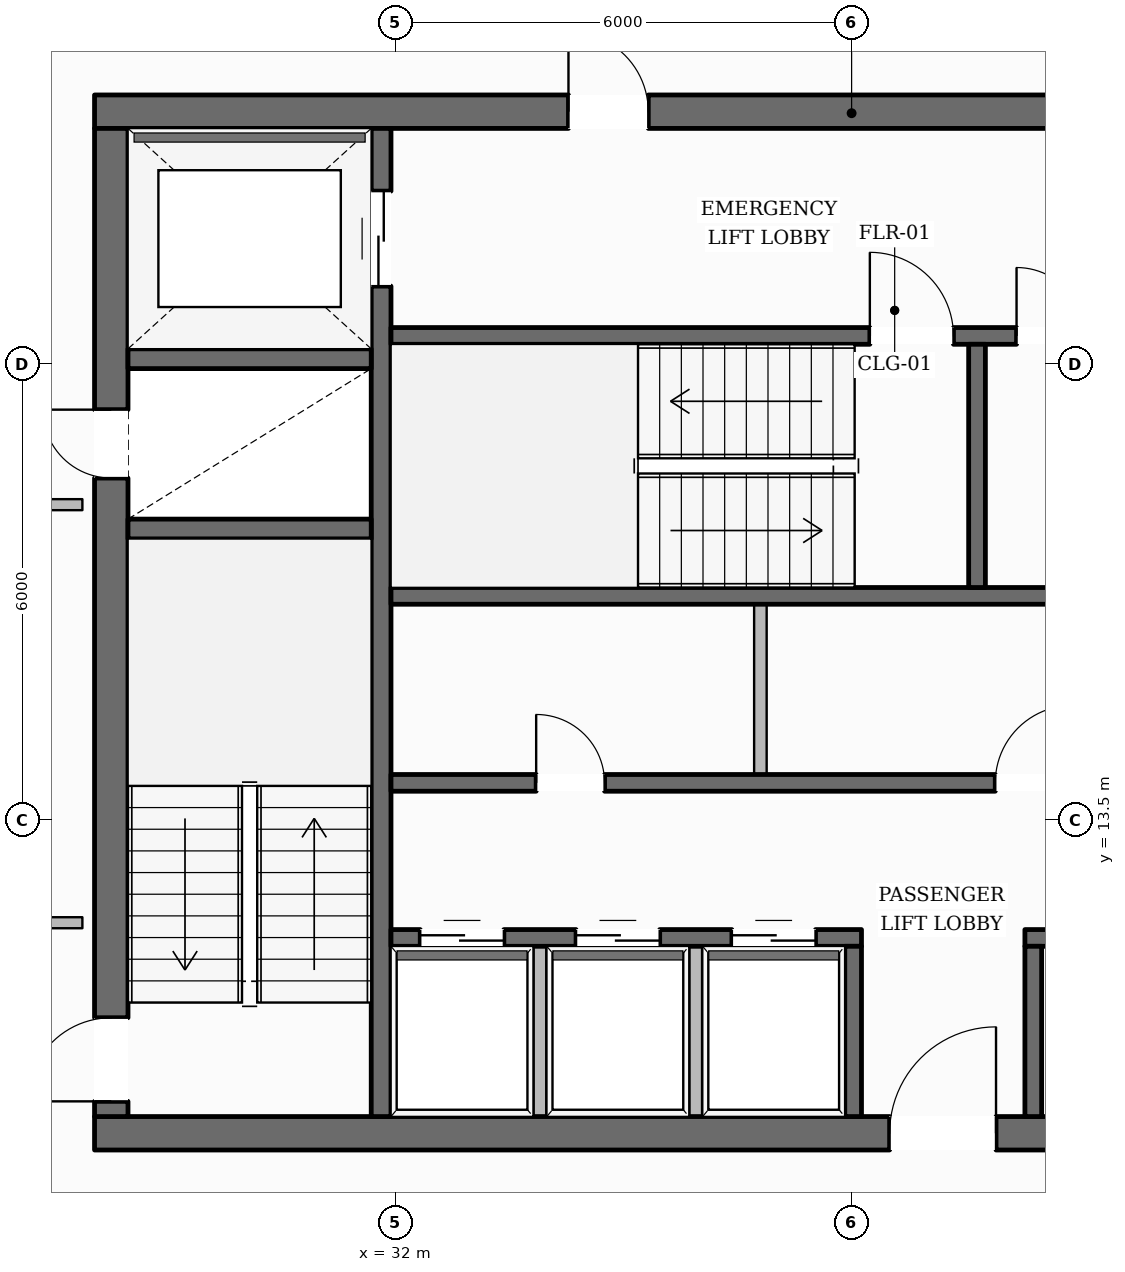
"""IFC4 building model, lengths in metres.
Left out: names, types, materials, properties, quantities, classifications, styles, units other than length and angle.
Written with IfcOpenShell. Run it as: python <this file> out.ifc"""

import sys

from ifc_helpers import new_model, si_unit, direction, frame, frame_2d, origin, place, context, subcontext, project, spatial, rectangle, extrude, element, fill, save


model = new_model("IFC4")
c1 = context("Model", 3, precision=1e-05, world=origin(), true_north=direction((0.0, 1.0)))
c2 = subcontext(c1, "Body", "Model", "MODEL_VIEW")
j1 = project(units=[si_unit("LENGTHUNIT", "METRE"), si_unit("PLANEANGLEUNIT", "RADIAN")], contexts=[c1])
p1 = place(None, origin())
s1 = spatial("IfcSite", under=j1, at=p1, CompositionType="ELEMENT")
p2 = place(p1, origin())
s2 = spatial("IfcBuilding", under=s1, at=p2, CompositionType="ELEMENT")
p3 = place(p2, frame((0.0, 0.0, 226.6)))
s3 = spatial("IfcBuildingStorey", under=s2, at=p3, CompositionType="ELEMENT", Elevation=226.6)
p4 = place(p3, frame((28.04, 9.38, 0.0), z_axis=(0.0, 0.0, 1.0), x_axis=(1.0, 0.0, 0.0)))
e1 = element("IfcWall", 1, at=p4, inside=s3, PredefinedType="SOLIDWALL", context=c2, shape_type="SweptSolid", body=[
    extrude(rectangle(XDim=19.92, YDim=0.44, at=frame_2d((9.96, 0.0))), origin(), (0.0, 0.0, 1.0), 3.6),
])
p5 = place(p4, frame((10.46, 0.0, 0.0)))
e2 = element("IfcOpeningElement", 2, at=p5, cuts=e1, PredefinedType="OPENING", context=c2, shape_type="SweptSolid", body=[
    extrude(rectangle(XDim=1.4, YDim=2.2, at=frame_2d((0.7, 1.1))), frame((0.0, 0.23, 0.0), z_axis=(0.0, -1.0, 0.0), x_axis=(1.0, 0.0, 0.0)), (0.0, 0.0, 1.0), 0.46),
])
p6 = place(p3, frame((28.04, 22.82, 0.0), z_axis=(0.0, 0.0, 1.0), x_axis=(1.0, 0.0, 0.0)))
e3 = element("IfcWall", 3, at=p6, inside=s3, PredefinedType="SOLIDWALL", context=c2, shape_type="SweptSolid", body=[
    extrude(rectangle(XDim=19.92, YDim=0.44, at=frame_2d((9.96, 0.0))), origin(), (0.0, 0.0, 1.0), 3.6),
])
p7 = place(p6, frame((6.235, 0.0, 0.0)))
e4 = element("IfcOpeningElement", 4, at=p7, cuts=e3, PredefinedType="OPENING", context=c2, shape_type="SweptSolid", body=[
    extrude(rectangle(XDim=1.05, YDim=2.15, at=frame_2d((0.525, 1.075))), frame((0.0, 0.23, 0.0), z_axis=(0.0, -1.0, 0.0), x_axis=(1.0, 0.0, 0.0)), (0.0, 0.0, 1.0), 0.46),
])
p8 = place(p6, frame((12.635, 0.0, 0.0)))
e5 = element("IfcOpeningElement", 5, at=p8, cuts=e3, PredefinedType="OPENING", context=c2, shape_type="SweptSolid", body=[
    extrude(rectangle(XDim=1.05, YDim=2.15, at=frame_2d((0.525, 1.075))), frame((0.0, 0.23, 0.0), z_axis=(0.0, -1.0, 0.0), x_axis=(1.0, 0.0, 0.0)), (0.0, 0.0, 1.0), 0.46),
])
p9 = place(p3, frame((28.26, 9.6, 0.0), z_axis=(0.0, 0.0, 1.0), x_axis=(0.0, 1.0, 0.0)))
e6 = element("IfcWall", 6, at=p9, inside=s3, PredefinedType="SOLIDWALL", context=c2, shape_type="SweptSolid", body=[
    extrude(rectangle(XDim=13.0, YDim=0.44, at=frame_2d((6.5, 0.0))), origin(), (0.0, 0.0, 1.0), 3.6),
])
p10 = place(p9, frame((0.2, 0.0, 0.0)))
e7 = element("IfcOpeningElement", 7, at=p10, cuts=e6, PredefinedType="OPENING", context=c2, shape_type="SweptSolid", body=[
    extrude(rectangle(XDim=1.1, YDim=2.15, at=frame_2d((0.55, 1.075))), frame((0.0, 0.23, 0.0), z_axis=(0.0, -1.0, 0.0), x_axis=(1.0, 0.0, 0.0)), (0.0, 0.0, 1.0), 0.46),
])
p11 = place(p9, frame((8.4, 0.0, 0.0)))
e8 = element("IfcOpeningElement", 8, at=p11, cuts=e6, PredefinedType="OPENING", context=c2, shape_type="SweptSolid", body=[
    extrude(rectangle(XDim=0.9, YDim=2.1, at=frame_2d((0.45, 1.05))), frame((0.0, 0.23, 0.0), z_axis=(0.0, -1.0, 0.0), x_axis=(1.0, 0.0, 0.0)), (0.0, 0.0, 1.0), 0.46),
])
p12 = place(p3, frame((31.81, 9.6, 0.0), z_axis=(0.0, 0.0, 1.0), x_axis=(0.0, 1.0, 0.0)))
e9 = element("IfcWall", 9, at=p12, inside=s3, PredefinedType="SHEAR", context=c2, shape_type="SweptSolid", body=[
    extrude(rectangle(XDim=13.0, YDim=0.26, at=frame_2d((6.5, 0.0))), origin(), (0.0, 0.0, 1.0), 3.6),
])
p13 = place(p12, frame((10.925, 0.0, 0.0)))
e10 = element("IfcOpeningElement", 10, at=p13, cuts=e9, PredefinedType="OPENING", context=c2, shape_type="SweptSolid", body=[
    extrude(rectangle(XDim=1.25, YDim=2.25, at=frame_2d((0.625, 1.125))), frame((0.0, 0.14, 0.0), z_axis=(0.0, -1.0, 0.0), x_axis=(1.0, 0.0, 0.0)), (0.0, 0.0, 1.0), 0.28),
])
for number, where, z_axis, x_axis in (
    (11, (28.48, 17.33, 0.0), (0.0, 0.0, 1.0), (1.0, 0.0, 0.0)),
    (12, (28.48, 19.57, 0.0), (0.0, 0.0, 1.0), (1.0, 0.0, 0.0)),
):
    element("IfcWall", number, at=place(p3, frame(where, z_axis=z_axis, x_axis=x_axis)), inside=s3, PredefinedType="SHEAR", context=c2, shape_type="SweptSolid", body=[
        extrude(rectangle(XDim=3.2, YDim=0.26, at=frame_2d((1.6, 0.0))), origin(), (0.0, 0.0, 1.0), 3.6),
    ])
p14 = place(p3, frame((31.94, 19.87, 0.0), z_axis=(0.0, 0.0, 1.0), x_axis=(1.0, 0.0, 0.0)))
e13 = element("IfcWall", 13, at=p14, inside=s3, PredefinedType="SOLIDWALL", context=c2, shape_type="SweptSolid", body=[
    extrude(rectangle(XDim=12.12, YDim=0.22, at=frame_2d((6.06, 0.0))), origin(), (0.0, 0.0, 1.0), 3.6),
])
p15 = place(p14, frame((6.3, 0.0, 0.0)))
e14 = element("IfcOpeningElement", 14, at=p15, cuts=e13, PredefinedType="OPENING", context=c2, shape_type="SweptSolid", body=[
    extrude(rectangle(XDim=1.1, YDim=2.15, at=frame_2d((0.55, 1.075))), frame((0.0, 0.12, 0.0), z_axis=(0.0, -1.0, 0.0), x_axis=(1.0, 0.0, 0.0)), (0.0, 0.0, 1.0), 0.24),
])
p16 = place(p14, frame((8.23, 0.0, 0.0)))
e15 = element("IfcOpeningElement", 15, at=p16, cuts=e13, PredefinedType="OPENING", context=c2, shape_type="SweptSolid", body=[
    extrude(rectangle(XDim=0.9, YDim=2.1, at=frame_2d((0.45, 1.05))), frame((0.0, 0.12, 0.0), z_axis=(0.0, -1.0, 0.0), x_axis=(1.0, 0.0, 0.0)), (0.0, 0.0, 1.0), 0.24),
])
p17 = place(p14, frame((10.45, 0.0, 0.0)))
e16 = element("IfcOpeningElement", 16, at=p17, cuts=e13, PredefinedType="OPENING", context=c2, shape_type="SweptSolid", body=[
    extrude(rectangle(XDim=0.9, YDim=2.1, at=frame_2d((0.45, 1.05))), frame((0.0, 0.12, 0.0), z_axis=(0.0, -1.0, 0.0), x_axis=(1.0, 0.0, 0.0)), (0.0, 0.0, 1.0), 0.24),
])
p18 = place(p3, frame((31.94, 16.45, 0.0), z_axis=(0.0, 0.0, 1.0), x_axis=(1.0, 0.0, 0.0)))
e17 = element("IfcWall", 17, at=p18, inside=s3, PredefinedType="SOLIDWALL", context=c2, shape_type="SweptSolid", body=[
    extrude(rectangle(XDim=12.12, YDim=0.22, at=frame_2d((6.06, 0.0))), origin(), (0.0, 0.0, 1.0), 3.6),
])
p19 = place(p3, frame((39.65, 16.56, 0.0), z_axis=(0.0, 0.0, 1.0), x_axis=(0.0, 1.0, 0.0)))
e18 = element("IfcWall", 18, at=p19, inside=s3, PredefinedType="SOLIDWALL", context=c2, shape_type="SweptSolid", body=[
    extrude(rectangle(XDim=3.2, YDim=0.22, at=frame_2d((1.6, 0.0))), origin(), (0.0, 0.0, 1.0), 3.6),
])
p20 = place(p3, frame((31.94, 13.99, 0.0), z_axis=(0.0, 0.0, 1.0), x_axis=(1.0, 0.0, 0.0)))
e19 = element("IfcWall", 19, at=p20, inside=s3, PredefinedType="SOLIDWALL", context=c2, shape_type="SweptSolid", body=[
    extrude(rectangle(XDim=12.12, YDim=0.22, at=frame_2d((6.06, 0.0))), origin(), (0.0, 0.0, 1.0), 3.6),
])
p21 = place(p20, frame((1.91, 0.0, 0.0)))
e20 = element("IfcOpeningElement", 20, at=p21, cuts=e19, PredefinedType="OPENING", context=c2, shape_type="SweptSolid", body=[
    extrude(rectangle(XDim=0.9, YDim=2.1, at=frame_2d((0.45, 1.05))), frame((0.0, 0.12, 0.0), z_axis=(0.0, -1.0, 0.0), x_axis=(1.0, 0.0, 0.0)), (0.0, 0.0, 1.0), 0.24),
])
p22 = place(p20, frame((7.95, 0.0, 0.0)))
e21 = element("IfcOpeningElement", 21, at=p22, cuts=e19, PredefinedType="OPENING", context=c2, shape_type="SweptSolid", body=[
    extrude(rectangle(XDim=1.02, YDim=2.15, at=frame_2d((0.51, 1.075))), frame((0.0, 0.12, 0.0), z_axis=(0.0, -1.0, 0.0), x_axis=(1.0, 0.0, 0.0)), (0.0, 0.0, 1.0), 0.24),
])
p23 = place(p3, frame((31.94, 11.95, 0.0), z_axis=(0.0, 0.0, 1.0), x_axis=(1.0, 0.0, 0.0)))
e22 = element("IfcWall", 22, at=p23, inside=s3, PredefinedType="SOLIDWALL", context=c2, shape_type="SweptSolid", body=[
    extrude(rectangle(XDim=6.19, YDim=0.22, at=frame_2d((3.095, 0.0))), origin(), (0.0, 0.0, 1.0), 3.6),
])
p24 = place(p23, frame((0.385, 0.0, 0.0)))
e23 = element("IfcOpeningElement", 23, at=p24, cuts=e22, PredefinedType="OPENING", context=c2, shape_type="SweptSolid", body=[
    extrude(rectangle(XDim=1.1, YDim=2.2, at=frame_2d((0.55, 1.1))), frame((0.0, 0.12, 0.0), z_axis=(0.0, -1.0, 0.0), x_axis=(1.0, 0.0, 0.0)), (0.0, 0.0, 1.0), 0.24),
])
p25 = place(p23, frame((2.435, 0.0, 0.0)))
e24 = element("IfcOpeningElement", 24, at=p25, cuts=e22, PredefinedType="OPENING", context=c2, shape_type="SweptSolid", body=[
    extrude(rectangle(XDim=1.1, YDim=2.2, at=frame_2d((0.55, 1.1))), frame((0.0, 0.12, 0.0), z_axis=(0.0, -1.0, 0.0), x_axis=(1.0, 0.0, 0.0)), (0.0, 0.0, 1.0), 0.24),
])
p26 = place(p23, frame((4.485, 0.0, 0.0)))
e25 = element("IfcOpeningElement", 25, at=p26, cuts=e22, PredefinedType="OPENING", context=c2, shape_type="SweptSolid", body=[
    extrude(rectangle(XDim=1.1, YDim=2.2, at=frame_2d((0.55, 1.1))), frame((0.0, 0.12, 0.0), z_axis=(0.0, -1.0, 0.0), x_axis=(1.0, 0.0, 0.0)), (0.0, 0.0, 1.0), 0.24),
])
p27 = place(p3, frame((40.28, 11.95, 0.0), z_axis=(0.0, 0.0, 1.0), x_axis=(1.0, 0.0, 0.0)))
e26 = element("IfcWall", 26, at=p27, inside=s3, PredefinedType="SOLIDWALL", context=c2, shape_type="SweptSolid", body=[
    extrude(rectangle(XDim=3.78, YDim=0.22, at=frame_2d((1.89, 0.0))), origin(), (0.0, 0.0, 1.0), 3.6),
])
p28 = place(p27, frame((1.55, 0.0, 0.0)))
e27 = element("IfcOpeningElement", 27, at=p28, cuts=e26, PredefinedType="OPENING", context=c2, shape_type="SweptSolid", body=[
    extrude(rectangle(XDim=0.9, YDim=2.1, at=frame_2d((0.45, 1.05))), frame((0.0, 0.12, 0.0), z_axis=(0.0, -1.0, 0.0), x_axis=(1.0, 0.0, 0.0)), (0.0, 0.0, 1.0), 0.24),
])
for number, where, z_axis, x_axis in (
    (28, (38.02, 9.6, 0.0), (0.0, 0.0, 1.0), (0.0, 1.0, 0.0)),
    (29, (40.39, 9.6, 0.0), (0.0, 0.0, 1.0), (0.0, 1.0, 0.0)),
):
    element("IfcWall", number, at=place(p3, frame(where, z_axis=z_axis, x_axis=x_axis)), inside=s3, PredefinedType="SOLIDWALL", context=c2, shape_type="SweptSolid", body=[
        extrude(rectangle(XDim=2.24, YDim=0.22, at=frame_2d((1.12, 0.0))), origin(), (0.0, 0.0, 1.0), 3.6),
    ])
p29 = place(p3, frame((14.425, 10.865, 0.0), z_axis=(0.0, 0.0, 1.0), x_axis=(0.497768108872, 0.867310157781, 0.0)))
e30 = element("IfcWall", 30, at=p29, inside=s3, PredefinedType="STANDARD", context=c2, shape_type="SweptSolid", body=[
    extrude(rectangle(XDim=39.647, YDim=0.35, at=frame_2d((19.823, 0.0))), origin(), (0.0, 0.0, 1.0), 3.132),
])
p30 = place(p29, frame((35.221, 0.0, 0.65)))
e31 = element("IfcOpeningElement", 31, at=p30, cuts=e30, PredefinedType="OPENING", context=c2, shape_type="SweptSolid", body=[
    extrude(rectangle(XDim=1.45, YDim=1.75, at=frame_2d((0.725, 0.875))), frame((0.0, 0.185, 0.0), z_axis=(0.0, -1.0, 0.0), x_axis=(1.0, 0.0, 0.0)), (0.0, 0.0, 1.0), 0.37),
])
p31 = place(p29, frame((28.771, 0.0, 0.65)))
e32 = element("IfcOpeningElement", 32, at=p31, cuts=e30, PredefinedType="OPENING", context=c2, shape_type="SweptSolid", body=[
    extrude(rectangle(XDim=1.45, YDim=1.75, at=frame_2d((0.725, 0.875))), frame((0.0, 0.185, 0.0), z_axis=(0.0, -1.0, 0.0), x_axis=(1.0, 0.0, 0.0)), (0.0, 0.0, 1.0), 0.37),
])
p32 = place(p29, frame((15.872, 0.0, 0.65)))
e33 = element("IfcOpeningElement", 33, at=p32, cuts=e30, PredefinedType="OPENING", context=c2, shape_type="SweptSolid", body=[
    extrude(rectangle(XDim=1.45, YDim=1.75, at=frame_2d((0.725, 0.875))), frame((0.0, 0.185, 0.0), z_axis=(0.0, -1.0, 0.0), x_axis=(1.0, 0.0, 0.0)), (0.0, 0.0, 1.0), 0.37),
])
p33 = place(p29, frame((9.423, 0.0, 0.65)))
e34 = element("IfcOpeningElement", 34, at=p33, cuts=e30, PredefinedType="OPENING", context=c2, shape_type="SweptSolid", body=[
    extrude(rectangle(XDim=1.45, YDim=1.75, at=frame_2d((0.725, 0.875))), frame((0.0, 0.185, 0.0), z_axis=(0.0, -1.0, 0.0), x_axis=(1.0, 0.0, 0.0)), (0.0, 0.0, 1.0), 0.37),
])
p34 = place(p29, frame((2.973, 0.0, 0.65)))
e35 = element("IfcOpeningElement", 35, at=p34, cuts=e30, PredefinedType="OPENING", context=c2, shape_type="SweptSolid", body=[
    extrude(rectangle(XDim=1.45, YDim=1.75, at=frame_2d((0.725, 0.875))), frame((0.0, 0.185, 0.0), z_axis=(0.0, -1.0, 0.0), x_axis=(1.0, 0.0, 0.0)), (0.0, 0.0, 1.0), 0.37),
])
for number, where, z_axis, x_axis in (
    (36, (33.9, 9.52, 0.0), (0.0, 0.0, 1.0), (0.0, 1.0, 0.0)),
    (37, (35.95, 9.52, 0.0), (0.0, 0.0, 1.0), (0.0, 1.0, 0.0)),
):
    element("IfcWall", number, at=place(p3, frame(where, z_axis=z_axis, x_axis=x_axis)), inside=s3, PredefinedType="PARTITIONING", context=c2, shape_type="SweptSolid", body=[
        extrude(rectangle(XDim=2.32, YDim=0.165, at=frame_2d((1.16, 0.0))), origin(), (0.0, 0.0, 1.0), 3.6),
    ])
p35 = place(p3, frame((36.8, 14.1, 0.0), z_axis=(0.0, 0.0, 1.0), x_axis=(0.0, 1.0, 0.0)))
e38 = element("IfcWall", 38, at=p35, inside=s3, PredefinedType="PARTITIONING", context=c2, shape_type="SweptSolid", body=[
    extrude(rectangle(XDim=2.24, YDim=0.165, at=frame_2d((1.12, 0.0))), origin(), (0.0, 0.0, 1.0), 3.6),
])
for number, where, z_axis, x_axis in (
    (39, (27.88, 17.65, 0.0), (0.0, 0.0, 1.0), (-1.0, 0.0, 0.0)),
    (40, (26.06, 12.15, 0.0), (0.0, 0.0, 1.0), (1.0, 0.0, 0.0)),
):
    element("IfcWall", number, at=place(p3, frame(where, z_axis=z_axis, x_axis=x_axis)), inside=s3, PredefinedType="PARTITIONING", context=c2, shape_type="SweptSolid", body=[
        extrude(rectangle(XDim=1.82, YDim=0.145, at=frame_2d((0.91, 0.0))), origin(), (0.0, 0.0, 1.0), 3.6),
    ])
p36 = place(p10, origin())
e41 = element("IfcDoor", 41, at=p36, inside=s3, OperationType="SINGLE_SWING_LEFT", PredefinedType="DOOR", context=c2, shape_type="SweptSolid", body=[
    extrude(rectangle(XDim=1.1, YDim=2.15, at=frame_2d((0.55, 1.075))), frame((0.0, 0.025, 0.0), z_axis=(0.0, -1.0, 0.0), x_axis=(1.0, 0.0, 0.0)), (0.0, 0.0, 1.0), 0.05),
])
fill(e7, e41)
p37 = place(p15, origin())
e42 = element("IfcDoor", 42, at=p37, inside=s3, OperationType="SINGLE_SWING_LEFT", PredefinedType="DOOR", context=c2, shape_type="SweptSolid", body=[
    extrude(rectangle(XDim=1.1, YDim=2.15, at=frame_2d((0.55, 1.075))), frame((0.0, 0.025, 0.0), z_axis=(0.0, -1.0, 0.0), x_axis=(1.0, 0.0, 0.0)), (0.0, 0.0, 1.0), 0.05),
])
fill(e14, e42)
p38 = place(p11, origin())
e43 = element("IfcDoor", 43, at=p38, inside=s3, OperationType="SINGLE_SWING_RIGHT", PredefinedType="DOOR", context=c2, shape_type="SweptSolid", body=[
    extrude(rectangle(XDim=0.9, YDim=2.1, at=frame_2d((0.45, 1.05))), frame((0.0, 0.025, 0.0), z_axis=(0.0, -1.0, 0.0), x_axis=(1.0, 0.0, 0.0)), (0.0, 0.0, 1.0), 0.05),
])
fill(e8, e43)
p39 = place(p7, origin())
e44 = element("IfcDoor", 44, at=p39, inside=s3, OperationType="SINGLE_SWING_LEFT", PredefinedType="DOOR", context=c2, shape_type="SweptSolid", body=[
    extrude(rectangle(XDim=1.05, YDim=2.15, at=frame_2d((0.525, 1.075))), frame((0.0, 0.025, 0.0), z_axis=(0.0, -1.0, 0.0), x_axis=(1.0, 0.0, 0.0)), (0.0, 0.0, 1.0), 0.05),
])
fill(e4, e44)
p40 = place(p13, origin())
e45 = element("IfcDoor", 45, at=p40, inside=s3, OperationType="DOUBLE_DOOR_SLIDING", PredefinedType="DOOR", context=c2, shape_type="SweptSolid", body=[
    extrude(rectangle(XDim=1.25, YDim=2.25, at=frame_2d((0.625, 1.125))), frame((0.0, 0.025, 0.0), z_axis=(0.0, -1.0, 0.0), x_axis=(1.0, 0.0, 0.0)), (0.0, 0.0, 1.0), 0.05),
])
fill(e10, e45)
p41 = place(p5, origin())
e46 = element("IfcDoor", 46, at=p41, inside=s3, OperationType="SINGLE_SWING_RIGHT", PredefinedType="DOOR", context=c2, shape_type="SweptSolid", body=[
    extrude(rectangle(XDim=1.4, YDim=2.2, at=frame_2d((0.7, 1.1))), frame((0.0, 0.025, 0.0), z_axis=(0.0, -1.0, 0.0), x_axis=(1.0, 0.0, 0.0)), (0.0, 0.0, 1.0), 0.05),
])
fill(e2, e46)
p42 = place(p24, origin())
e47 = element("IfcDoor", 47, at=p42, inside=s3, OperationType="DOUBLE_DOOR_SLIDING", PredefinedType="DOOR", context=c2, shape_type="SweptSolid", body=[
    extrude(rectangle(XDim=1.1, YDim=2.2, at=frame_2d((0.55, 1.1))), frame((0.0, 0.025, 0.0), z_axis=(0.0, -1.0, 0.0), x_axis=(1.0, 0.0, 0.0)), (0.0, 0.0, 1.0), 0.05),
])
fill(e23, e47)
p43 = place(p25, origin())
e48 = element("IfcDoor", 48, at=p43, inside=s3, OperationType="DOUBLE_DOOR_SLIDING", PredefinedType="DOOR", context=c2, shape_type="SweptSolid", body=[
    extrude(rectangle(XDim=1.1, YDim=2.2, at=frame_2d((0.55, 1.1))), frame((0.0, 0.025, 0.0), z_axis=(0.0, -1.0, 0.0), x_axis=(1.0, 0.0, 0.0)), (0.0, 0.0, 1.0), 0.05),
])
fill(e24, e48)
p44 = place(p26, origin())
e49 = element("IfcDoor", 49, at=p44, inside=s3, OperationType="DOUBLE_DOOR_SLIDING", PredefinedType="DOOR", context=c2, shape_type="SweptSolid", body=[
    extrude(rectangle(XDim=1.1, YDim=2.2, at=frame_2d((0.55, 1.1))), frame((0.0, 0.025, 0.0), z_axis=(0.0, -1.0, 0.0), x_axis=(1.0, 0.0, 0.0)), (0.0, 0.0, 1.0), 0.05),
])
fill(e25, e49)
p45 = place(p21, origin())
e50 = element("IfcDoor", 50, at=p45, inside=s3, OperationType="SINGLE_SWING_LEFT", PredefinedType="DOOR", context=c2, shape_type="SweptSolid", body=[
    extrude(rectangle(XDim=0.9, YDim=2.1, at=frame_2d((0.45, 1.05))), frame((0.0, 0.025, 0.0), z_axis=(0.0, -1.0, 0.0), x_axis=(1.0, 0.0, 0.0)), (0.0, 0.0, 1.0), 0.05),
])
fill(e20, e50)
p46 = place(p22, origin())
e51 = element("IfcDoor", 51, at=p46, inside=s3, OperationType="SINGLE_SWING_RIGHT", PredefinedType="DOOR", context=c2, shape_type="SweptSolid", body=[
    extrude(rectangle(XDim=1.02, YDim=2.15, at=frame_2d((0.51, 1.075))), frame((0.0, 0.025, 0.0), z_axis=(0.0, -1.0, 0.0), x_axis=(1.0, 0.0, 0.0)), (0.0, 0.0, 1.0), 0.05),
])
fill(e21, e51)
p47 = place(p16, origin())
e52 = element("IfcDoor", 52, at=p47, inside=s3, OperationType="SINGLE_SWING_LEFT", PredefinedType="DOOR", context=c2, shape_type="SweptSolid", body=[
    extrude(rectangle(XDim=0.9, YDim=2.1, at=frame_2d((0.45, 1.05))), frame((0.0, 0.025, 0.0), z_axis=(0.0, -1.0, 0.0), x_axis=(1.0, 0.0, 0.0)), (0.0, 0.0, 1.0), 0.05),
])
fill(e15, e52)
save(model, sys.argv[1])
